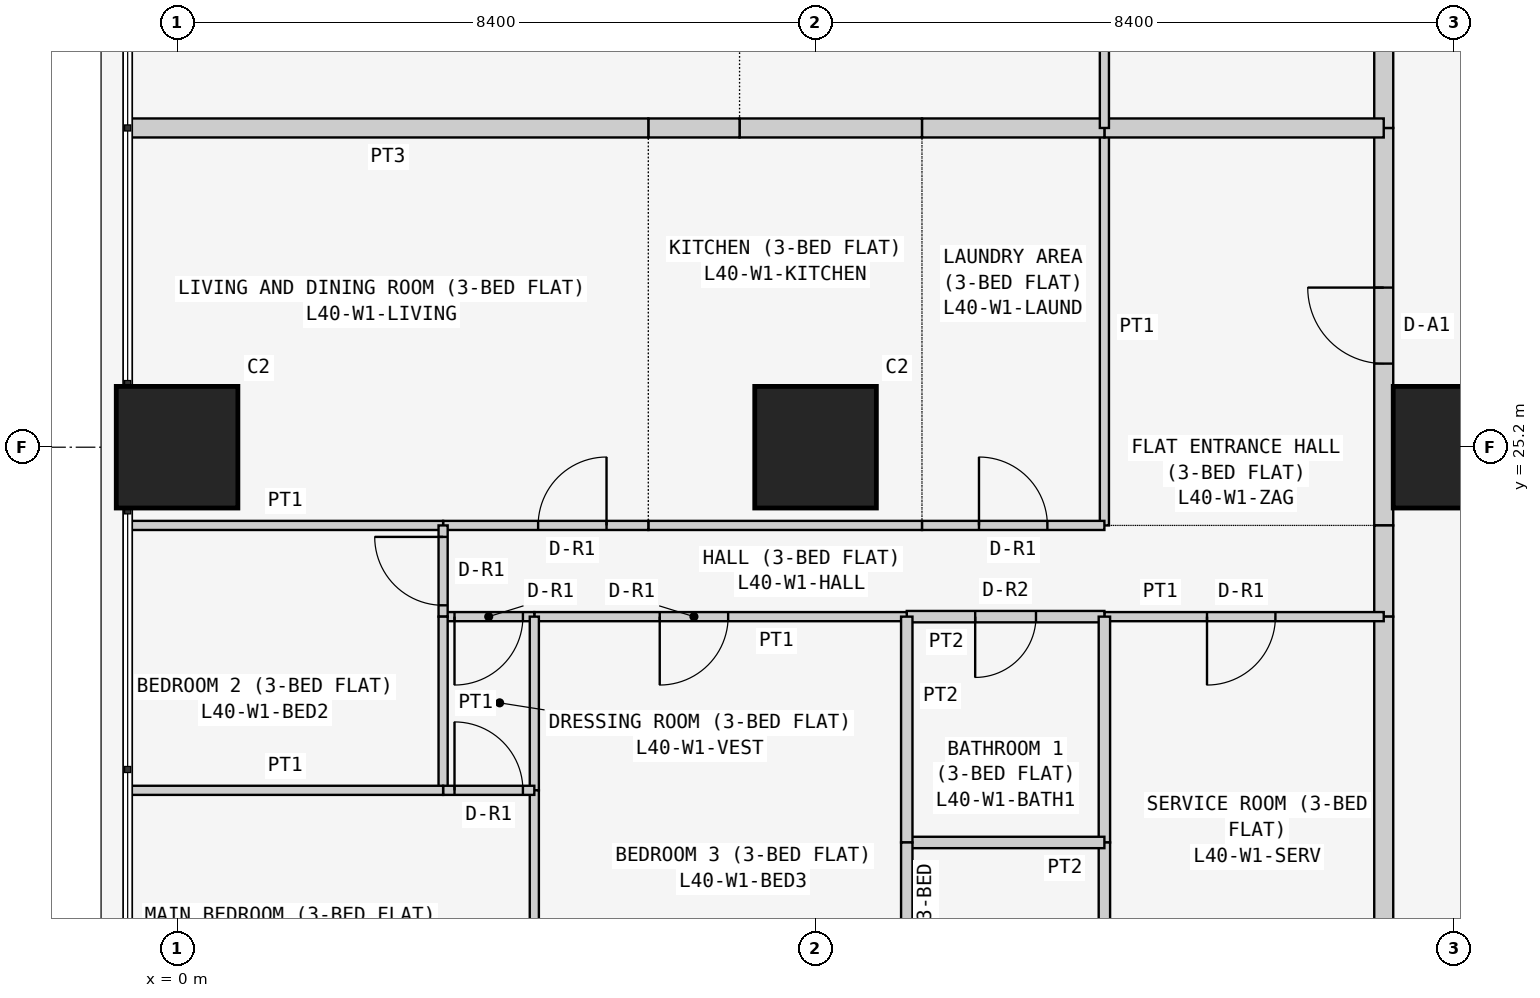
"""IFC4 building model, lengths in metres.
Left out: names, types, materials, properties, quantities, classifications, styles, units other than length and angle.
Written with IfcOpenShell. Run it as: python <this file> out.ifc"""

import sys

from ifc_helpers import new_model, si_unit, direction, frame, frame_2d, origin, origin_2d, place, context, subcontext, project, spatial, rectangle, extrude, element, fill, save


model = new_model("IFC4")
c1 = context("Model", 3, precision=1e-05, world=origin(), true_north=direction((0.0, 1.0)))
c2 = subcontext(c1, "Body", "Model", "MODEL_VIEW")
j1 = project(units=[si_unit("LENGTHUNIT", "METRE"), si_unit("PLANEANGLEUNIT", "RADIAN")], contexts=[c1])
p1 = place(None, origin())
s1 = spatial("IfcSite", under=j1, at=p1, CompositionType="ELEMENT")
p2 = place(p1, origin())
s2 = spatial("IfcBuilding", under=s1, at=p2, CompositionType="ELEMENT")
p3 = place(p2, frame((0.0, 0.0, 155.7)))
s3 = spatial("IfcBuildingStorey", under=s2, at=p3, CompositionType="ELEMENT", Elevation=155.7)
for number, where, z_axis, x_axis in (
    (1, (0.0, 25.2, 0.0), (0.0, 0.0, 1.0), (1.0, 0.0, 0.0)),
    (2, (8.4, 25.2, 0.0), (0.0, 0.0, 1.0), (1.0, 0.0, 0.0)),
    (3, (16.8, 25.2, 0.0), (0.0, 0.0, 1.0), (1.0, 0.0, 0.0)),
):
    element("IfcColumn", number, at=place(p3, frame(where, z_axis=z_axis, x_axis=x_axis)), inside=s3, PredefinedType="COLUMN", context=c2, shape_type="SweptSolid", body=[
        extrude(rectangle(XDim=1.6, YDim=1.6, at=origin_2d()), origin(), (0.0, 0.0, 1.0), 3.6),
    ])
p4 = place(p3, frame((15.875, 24.171, 0.0), z_axis=(0.0, 0.0, 1.0), x_axis=(0.0, 1.0, 0.0)))
e4 = element("IfcWall", 4, at=p4, inside=s3, PredefinedType="PARTITIONING", context=c2, shape_type="SweptSolid", body=[
    extrude(rectangle(XDim=5.229, YDim=0.25, at=frame_2d((2.615, 0.0))), origin(), (0.0, 0.0, 1.0), 3.45),
])
p5 = place(p4, frame((2.129, 0.0, 0.0)))
e5 = element("IfcOpeningElement", 5, at=p5, cuts=e4, PredefinedType="OPENING", context=c2, shape_type="SweptSolid", body=[
    extrude(rectangle(XDim=1.0, YDim=2.1, at=frame_2d((0.5, 1.05))), frame((0.0, 0.135, 0.0), z_axis=(0.0, -1.0, 0.0), x_axis=(1.0, 0.0, 0.0)), (0.0, 0.0, 1.0), 0.27),
])
p6 = place(p3, frame((15.875, 22.971, 0.0), z_axis=(0.0, 0.0, 1.0), x_axis=(0.0, 1.0, 0.0)))
e6 = element("IfcWall", 6, at=p6, inside=s3, PredefinedType="PARTITIONING", context=c2, shape_type="SweptSolid", body=[
    extrude(rectangle(XDim=1.2, YDim=0.25, at=frame_2d((0.6, 0.0))), origin(), (0.0, 0.0, 1.0), 3.45),
])
p7 = place(p3, frame((15.875, 16.1, 0.0), z_axis=(0.0, 0.0, 1.0), x_axis=(0.0, 1.0, 0.0)))
e7 = element("IfcWall", 7, at=p7, inside=s3, PredefinedType="PARTITIONING", context=c2, shape_type="SweptSolid", body=[
    extrude(rectangle(XDim=6.871, YDim=0.25, at=frame_2d((3.436, 0.0))), origin(), (0.0, 0.0, 1.0), 3.45),
])
p8 = place(p3, frame((15.875, 29.4, 0.0), z_axis=(0.0, 0.0, 1.0), x_axis=(0.0, 1.0, 0.0)))
e8 = element("IfcWall", 8, at=p8, inside=s3, PredefinedType="PARTITIONING", context=c2, shape_type="SweptSolid", body=[
    extrude(rectangle(XDim=5.229, YDim=0.25, at=frame_2d((2.615, 0.0))), origin(), (0.0, 0.0, 1.0), 3.45),
])
p9 = place(p8, frame((2.1, 0.0, 0.0)))
e9 = element("IfcOpeningElement", 9, at=p9, cuts=e8, PredefinedType="OPENING", context=c2, shape_type="SweptSolid", body=[
    extrude(rectangle(XDim=1.0, YDim=2.1, at=frame_2d((0.5, 1.05))), frame((0.0, 0.135, 0.0), z_axis=(0.0, -1.0, 0.0), x_axis=(1.0, 0.0, 0.0)), (0.0, 0.0, 1.0), 0.27),
])
p10 = place(p3, frame((12.2, 29.4, 0.0), z_axis=(0.0, 0.0, 1.0), x_axis=(0.0, -1.0, 0.0)))
e10 = element("IfcWall", 10, at=p10, inside=s3, PredefinedType="PARTITIONING", context=c2, shape_type="SweptSolid", body=[
    extrude(rectangle(XDim=5.229, YDim=0.12, at=frame_2d((2.615, 0.0))), origin(), (0.0, 0.0, 1.0), 3.45),
])
p11 = place(p3, frame((15.875, 29.4, 0.0), z_axis=(0.0, 0.0, 1.0), x_axis=(-1.0, 0.0, 0.0)))
e11 = element("IfcWall", 11, at=p11, inside=s3, PredefinedType="PARTITIONING", context=c2, shape_type="SweptSolid", body=[
    extrude(rectangle(XDim=3.675, YDim=0.25, at=frame_2d((1.837, 0.0))), origin(), (0.0, 0.0, 1.0), 3.45),
])
p12 = place(p3, frame((9.8, 24.171, 0.0), z_axis=(0.0, 0.0, 1.0), x_axis=(1.0, 0.0, 0.0)))
e12 = element("IfcWall", 12, at=p12, inside=s3, PredefinedType="PARTITIONING", context=c2, shape_type="SweptSolid", body=[
    extrude(rectangle(XDim=2.4, YDim=0.12, at=frame_2d((1.2, 0.0))), origin(), (0.0, 0.0, 1.0), 3.45),
])
p13 = place(p12, frame((0.75, 0.0, 0.0)))
e13 = element("IfcOpeningElement", 13, at=p13, cuts=e12, PredefinedType="OPENING", context=c2, shape_type="SweptSolid", body=[
    extrude(rectangle(XDim=0.9, YDim=2.1, at=frame_2d((0.45, 1.05))), frame((0.0, 0.07, 0.0), z_axis=(0.0, -1.0, 0.0), x_axis=(1.0, 0.0, 0.0)), (0.0, 0.0, 1.0), 0.14),
])
p14 = place(p3, frame((12.2, 29.4, 0.0), z_axis=(0.0, 0.0, 1.0), x_axis=(-1.0, 0.0, 0.0)))
e14 = element("IfcWall", 14, at=p14, inside=s3, PredefinedType="PARTITIONING", context=c2, shape_type="SweptSolid", body=[
    extrude(rectangle(XDim=2.4, YDim=0.25, at=frame_2d((1.2, 0.0))), origin(), (0.0, 0.0, 1.0), 3.45),
])
p15 = place(p3, frame((6.2, 24.171, 0.0), z_axis=(0.0, 0.0, 1.0), x_axis=(1.0, 0.0, 0.0)))
e15 = element("IfcWall", 15, at=p15, inside=s3, PredefinedType="PARTITIONING", context=c2, shape_type="SweptSolid", body=[
    extrude(rectangle(XDim=3.6, YDim=0.12, at=frame_2d((1.8, 0.0))), origin(), (0.0, 0.0, 1.0), 3.45),
])
p16 = place(p3, frame((9.8, 29.4, 0.0), z_axis=(0.0, 0.0, 1.0), x_axis=(-1.0, 0.0, 0.0)))
e16 = element("IfcWall", 16, at=p16, inside=s3, PredefinedType="PARTITIONING", context=c2, shape_type="SweptSolid", body=[
    extrude(rectangle(XDim=2.4, YDim=0.25, at=frame_2d((1.2, 0.0))), origin(), (0.0, 0.0, 1.0), 3.45),
])
p17 = place(p3, frame((7.4, 29.4, 0.0), z_axis=(0.0, 0.0, 1.0), x_axis=(-1.0, 0.0, 0.0)))
e17 = element("IfcWall", 17, at=p17, inside=s3, PredefinedType="PARTITIONING", context=c2, shape_type="SweptSolid", body=[
    extrude(rectangle(XDim=1.2, YDim=0.25, at=frame_2d((0.6, 0.0))), origin(), (0.0, 0.0, 1.0), 3.45),
])
p18 = place(p3, frame((3.5, 24.171, 0.0), z_axis=(0.0, 0.0, 1.0), x_axis=(1.0, 0.0, 0.0)))
e18 = element("IfcWall", 18, at=p18, inside=s3, PredefinedType="PARTITIONING", context=c2, shape_type="SweptSolid", body=[
    extrude(rectangle(XDim=2.7, YDim=0.12, at=frame_2d((1.35, 0.0))), origin(), (0.0, 0.0, 1.0), 3.45),
])
p19 = place(p18, frame((1.25, 0.0, 0.0)))
e19 = element("IfcOpeningElement", 19, at=p19, cuts=e18, PredefinedType="OPENING", context=c2, shape_type="SweptSolid", body=[
    extrude(rectangle(XDim=0.9, YDim=2.1, at=frame_2d((0.45, 1.05))), frame((0.0, 0.07, 0.0), z_axis=(0.0, -1.0, 0.0), x_axis=(1.0, 0.0, 0.0)), (0.0, 0.0, 1.0), 0.14),
])
p20 = place(p3, frame((-0.65, 24.171, 0.0), z_axis=(0.0, 0.0, 1.0), x_axis=(1.0, 0.0, 0.0)))
e20 = element("IfcWall", 20, at=p20, inside=s3, PredefinedType="PARTITIONING", context=c2, shape_type="SweptSolid", body=[
    extrude(rectangle(XDim=4.15, YDim=0.12, at=frame_2d((2.075, 0.0))), origin(), (0.0, 0.0, 1.0), 3.45),
])
p21 = place(p3, frame((6.2, 29.4, 0.0), z_axis=(0.0, 0.0, 1.0), x_axis=(-1.0, 0.0, 0.0)))
e21 = element("IfcWall", 21, at=p21, inside=s3, PredefinedType="PARTITIONING", context=c2, shape_type="SweptSolid", body=[
    extrude(rectangle(XDim=6.85, YDim=0.25, at=frame_2d((3.425, 0.0))), origin(), (0.0, 0.0, 1.0), 3.45),
])
p22 = place(p3, frame((12.2, 22.971, 0.0), z_axis=(0.0, 0.0, 1.0), x_axis=(1.0, 0.0, 0.0)))
e22 = element("IfcWall", 22, at=p22, inside=s3, PredefinedType="PARTITIONING", context=c2, shape_type="SweptSolid", body=[
    extrude(rectangle(XDim=3.675, YDim=0.12, at=frame_2d((1.837, 0.0))), origin(), (0.0, 0.0, 1.0), 3.45),
])
p23 = place(p22, frame((1.35, 0.0, 0.0)))
e23 = element("IfcOpeningElement", 23, at=p23, cuts=e22, PredefinedType="OPENING", context=c2, shape_type="SweptSolid", body=[
    extrude(rectangle(XDim=0.9, YDim=2.1, at=frame_2d((0.45, 1.05))), frame((0.0, 0.07, 0.0), z_axis=(0.0, -1.0, 0.0), x_axis=(1.0, 0.0, 0.0)), (0.0, 0.0, 1.0), 0.14),
])
p24 = place(p3, frame((9.6, 22.971, 0.0), z_axis=(0.0, 0.0, 1.0), x_axis=(1.0, 0.0, 0.0)))
e24 = element("IfcWall", 24, at=p24, inside=s3, PredefinedType="PARTITIONING", context=c2, shape_type="SweptSolid", body=[
    extrude(rectangle(XDim=2.6, YDim=0.15, at=frame_2d((1.3, 0.0))), origin(), (0.0, 0.0, 1.0), 3.45),
])
p25 = place(p24, frame((0.9, 0.0, 0.0)))
e25 = element("IfcOpeningElement", 25, at=p25, cuts=e24, PredefinedType="OPENING", context=c2, shape_type="SweptSolid", body=[
    extrude(rectangle(XDim=0.8, YDim=2.1, at=frame_2d((0.4, 1.05))), frame((0.0, 0.085, 0.0), z_axis=(0.0, -1.0, 0.0), x_axis=(1.0, 0.0, 0.0)), (0.0, 0.0, 1.0), 0.17),
])
p26 = place(p3, frame((4.7, 22.971, 0.0), z_axis=(0.0, 0.0, 1.0), x_axis=(1.0, 0.0, 0.0)))
e26 = element("IfcWall", 26, at=p26, inside=s3, PredefinedType="PARTITIONING", context=c2, shape_type="SweptSolid", body=[
    extrude(rectangle(XDim=4.9, YDim=0.12, at=frame_2d((2.45, 0.0))), origin(), (0.0, 0.0, 1.0), 3.45),
])
p27 = place(p26, frame((1.65, 0.0, 0.0)))
e27 = element("IfcOpeningElement", 27, at=p27, cuts=e26, PredefinedType="OPENING", context=c2, shape_type="SweptSolid", body=[
    extrude(rectangle(XDim=0.9, YDim=2.1, at=frame_2d((0.45, 1.05))), frame((0.0, 0.07, 0.0), z_axis=(0.0, -1.0, 0.0), x_axis=(1.0, 0.0, 0.0)), (0.0, 0.0, 1.0), 0.14),
])
p28 = place(p3, frame((3.5, 22.971, 0.0), z_axis=(0.0, 0.0, 1.0), x_axis=(1.0, 0.0, 0.0)))
e28 = element("IfcWall", 28, at=p28, inside=s3, PredefinedType="PARTITIONING", context=c2, shape_type="SweptSolid", body=[
    extrude(rectangle(XDim=1.2, YDim=0.12, at=frame_2d((0.6, 0.0))), origin(), (0.0, 0.0, 1.0), 3.45),
])
p29 = place(p28, frame((0.15, 0.0, 0.0)))
e29 = element("IfcOpeningElement", 29, at=p29, cuts=e28, PredefinedType="OPENING", context=c2, shape_type="SweptSolid", body=[
    extrude(rectangle(XDim=0.9, YDim=2.1, at=frame_2d((0.45, 1.05))), frame((0.0, 0.07, 0.0), z_axis=(0.0, -1.0, 0.0), x_axis=(1.0, 0.0, 0.0)), (0.0, 0.0, 1.0), 0.14),
])
p30 = place(p3, frame((3.5, 24.171, 0.0), z_axis=(0.0, 0.0, 1.0), x_axis=(0.0, -1.0, 0.0)))
e30 = element("IfcWall", 30, at=p30, inside=s3, PredefinedType="PARTITIONING", context=c2, shape_type="SweptSolid", body=[
    extrude(rectangle(XDim=1.2, YDim=0.12, at=frame_2d((0.6, 0.0))), origin(), (0.0, 0.0, 1.0), 3.45),
])
p31 = place(p30, frame((0.151, 0.0, 0.0)))
e31 = element("IfcOpeningElement", 31, at=p31, cuts=e30, PredefinedType="OPENING", context=c2, shape_type="SweptSolid", body=[
    extrude(rectangle(XDim=0.9, YDim=2.1, at=frame_2d((0.45, 1.05))), frame((0.0, 0.07, 0.0), z_axis=(0.0, -1.0, 0.0), x_axis=(1.0, 0.0, 0.0)), (0.0, 0.0, 1.0), 0.14),
])
p32 = place(p3, frame((12.2, 22.971, 0.0), z_axis=(0.0, 0.0, 1.0), x_axis=(0.0, -1.0, 0.0)))
e32 = element("IfcWall", 32, at=p32, inside=s3, PredefinedType="PARTITIONING", context=c2, shape_type="SweptSolid", body=[
    extrude(rectangle(XDim=2.971, YDim=0.15, at=frame_2d((1.485, 0.0))), origin(), (0.0, 0.0, 1.0), 3.45),
])
p33 = place(p3, frame((12.2, 20.0, 0.0), z_axis=(0.0, 0.0, 1.0), x_axis=(0.0, -1.0, 0.0)))
e33 = element("IfcWall", 33, at=p33, inside=s3, PredefinedType="PARTITIONING", context=c2, shape_type="SweptSolid", body=[
    extrude(rectangle(XDim=3.9, YDim=0.15, at=frame_2d((1.95, 0.0))), origin(), (0.0, 0.0, 1.0), 3.45),
])
p34 = place(p33, frame((1.45, 0.0, 0.0)))
e34 = element("IfcOpeningElement", 34, at=p34, cuts=e33, PredefinedType="OPENING", context=c2, shape_type="SweptSolid", body=[
    extrude(rectangle(XDim=0.8, YDim=2.1, at=frame_2d((0.4, 1.05))), frame((0.0, 0.085, 0.0), z_axis=(0.0, -1.0, 0.0), x_axis=(1.0, 0.0, 0.0)), (0.0, 0.0, 1.0), 0.17),
])
p35 = place(p3, frame((9.6, 20.0, 0.0), z_axis=(0.0, 0.0, 1.0), x_axis=(1.0, 0.0, 0.0)))
e35 = element("IfcWall", 35, at=p35, inside=s3, PredefinedType="PARTITIONING", context=c2, shape_type="SweptSolid", body=[
    extrude(rectangle(XDim=2.6, YDim=0.15, at=frame_2d((1.3, 0.0))), origin(), (0.0, 0.0, 1.0), 3.45),
])
p36 = place(p3, frame((9.6, 22.971, 0.0), z_axis=(0.0, 0.0, 1.0), x_axis=(0.0, -1.0, 0.0)))
e36 = element("IfcWall", 36, at=p36, inside=s3, PredefinedType="PARTITIONING", context=c2, shape_type="SweptSolid", body=[
    extrude(rectangle(XDim=2.971, YDim=0.15, at=frame_2d((1.485, 0.0))), origin(), (0.0, 0.0, 1.0), 3.45),
])
p37 = place(p3, frame((9.6, 20.0, 0.0), z_axis=(0.0, 0.0, 1.0), x_axis=(0.0, -1.0, 0.0)))
e37 = element("IfcWall", 37, at=p37, inside=s3, PredefinedType="PARTITIONING", context=c2, shape_type="SweptSolid", body=[
    extrude(rectangle(XDim=3.9, YDim=0.15, at=frame_2d((1.95, 0.0))), origin(), (0.0, 0.0, 1.0), 3.45),
])
p38 = place(p3, frame((4.7, 22.971, 0.0), z_axis=(0.0, 0.0, 1.0), x_axis=(0.0, -1.0, 0.0)))
e38 = element("IfcWall", 38, at=p38, inside=s3, PredefinedType="PARTITIONING", context=c2, shape_type="SweptSolid", body=[
    extrude(rectangle(XDim=2.285, YDim=0.12, at=frame_2d((1.143, 0.0))), origin(), (0.0, 0.0, 1.0), 3.45),
])
p39 = place(p3, frame((4.7, 20.686, 0.0), z_axis=(0.0, 0.0, 1.0), x_axis=(0.0, -1.0, 0.0)))
e39 = element("IfcWall", 39, at=p39, inside=s3, PredefinedType="PARTITIONING", context=c2, shape_type="SweptSolid", body=[
    extrude(rectangle(XDim=4.586, YDim=0.12, at=frame_2d((2.293, 0.0))), origin(), (0.0, 0.0, 1.0), 3.45),
])
p40 = place(p3, frame((3.5, 22.971, 0.0), z_axis=(0.0, 0.0, 1.0), x_axis=(0.0, -1.0, 0.0)))
e40 = element("IfcWall", 40, at=p40, inside=s3, PredefinedType="PARTITIONING", context=c2, shape_type="SweptSolid", body=[
    extrude(rectangle(XDim=2.285, YDim=0.12, at=frame_2d((1.143, 0.0))), origin(), (0.0, 0.0, 1.0), 3.45),
])
p41 = place(p3, frame((3.5, 20.686, 0.0), z_axis=(0.0, 0.0, 1.0), x_axis=(1.0, 0.0, 0.0)))
e41 = element("IfcWall", 41, at=p41, inside=s3, PredefinedType="PARTITIONING", context=c2, shape_type="SweptSolid", body=[
    extrude(rectangle(XDim=1.2, YDim=0.12, at=frame_2d((0.6, 0.0))), origin(), (0.0, 0.0, 1.0), 3.45),
])
p42 = place(p41, frame((0.15, 0.0, 0.0)))
e42 = element("IfcOpeningElement", 42, at=p42, cuts=e41, PredefinedType="OPENING", context=c2, shape_type="SweptSolid", body=[
    extrude(rectangle(XDim=0.9, YDim=2.1, at=frame_2d((0.45, 1.05))), frame((0.0, 0.07, 0.0), z_axis=(0.0, -1.0, 0.0), x_axis=(1.0, 0.0, 0.0)), (0.0, 0.0, 1.0), 0.14),
])
p43 = place(p3, frame((-0.65, 20.686, 0.0), z_axis=(0.0, 0.0, 1.0), x_axis=(1.0, 0.0, 0.0)))
e43 = element("IfcWall", 43, at=p43, inside=s3, PredefinedType="PARTITIONING", context=c2, shape_type="SweptSolid", body=[
    extrude(rectangle(XDim=4.15, YDim=0.12, at=frame_2d((2.075, 0.0))), origin(), (0.0, 0.0, 1.0), 3.45),
])
p44 = place(p3, frame((12.2, 29.4, 0.0), z_axis=(0.0, 0.0, 1.0), x_axis=(0.0, 1.0, 0.0)))
e44 = element("IfcWall", 44, at=p44, inside=s3, PredefinedType="PARTITIONING", context=c2, shape_type="SweptSolid", body=[
    extrude(rectangle(XDim=5.229, YDim=0.12, at=frame_2d((2.615, 0.0))), origin(), (0.0, 0.0, 1.0), 3.45),
])
p45 = place(p44, frame((1.05, 0.0, 0.0)))
e45 = element("IfcOpeningElement", 45, at=p45, cuts=e44, PredefinedType="OPENING", context=c2, shape_type="SweptSolid", body=[
    extrude(rectangle(XDim=0.9, YDim=2.1, at=frame_2d((0.45, 1.05))), frame((0.0, 0.07, 0.0), z_axis=(0.0, -1.0, 0.0), x_axis=(1.0, 0.0, 0.0)), (0.0, 0.0, 1.0), 0.14),
])
p46 = place(p5, origin())
e46 = element("IfcDoor", 46, at=p46, inside=s3, OperationType="SINGLE_SWING_RIGHT", PredefinedType="DOOR", context=c2, shape_type="SweptSolid", body=[
    extrude(rectangle(XDim=1.0, YDim=2.1, at=frame_2d((0.5, 1.05))), frame((0.0, 0.025, 0.0), z_axis=(0.0, -1.0, 0.0), x_axis=(1.0, 0.0, 0.0)), (0.0, 0.0, 1.0), 0.05),
])
fill(e5, e46)
p47 = place(p13, origin())
e47 = element("IfcDoor", 47, at=p47, inside=s3, OperationType="SINGLE_SWING_LEFT", PredefinedType="DOOR", context=c2, shape_type="SweptSolid", body=[
    extrude(rectangle(XDim=0.9, YDim=2.1, at=frame_2d((0.45, 1.05))), frame((0.0, 0.025, 0.0), z_axis=(0.0, -1.0, 0.0), x_axis=(1.0, 0.0, 0.0)), (0.0, 0.0, 1.0), 0.05),
])
fill(e13, e47)
p48 = place(p19, origin())
e48 = element("IfcDoor", 48, at=p48, inside=s3, OperationType="SINGLE_SWING_RIGHT", PredefinedType="DOOR", context=c2, shape_type="SweptSolid", body=[
    extrude(rectangle(XDim=0.9, YDim=2.1, at=frame_2d((0.45, 1.05))), frame((0.0, 0.025, 0.0), z_axis=(0.0, -1.0, 0.0), x_axis=(1.0, 0.0, 0.0)), (0.0, 0.0, 1.0), 0.05),
])
fill(e19, e48)
p49 = place(p23, frame((0.9, 0.0, 0.0), z_axis=(0.0, 0.0, 1.0), x_axis=(-1.0, 0.0, 0.0)))
e49 = element("IfcDoor", 49, at=p49, inside=s3, OperationType="SINGLE_SWING_RIGHT", PredefinedType="DOOR", context=c2, shape_type="SweptSolid", body=[
    extrude(rectangle(XDim=0.9, YDim=2.1, at=frame_2d((0.45, 1.05))), frame((0.0, 0.025, 0.0), z_axis=(0.0, -1.0, 0.0), x_axis=(1.0, 0.0, 0.0)), (0.0, 0.0, 1.0), 0.05),
])
fill(e23, e49)
p50 = place(p25, frame((0.8, 0.0, 0.0), z_axis=(0.0, 0.0, 1.0), x_axis=(-1.0, 0.0, 0.0)))
e50 = element("IfcDoor", 50, at=p50, inside=s3, OperationType="SINGLE_SWING_RIGHT", PredefinedType="DOOR", context=c2, shape_type="SweptSolid", body=[
    extrude(rectangle(XDim=0.8, YDim=2.1, at=frame_2d((0.4, 1.05))), frame((0.0, 0.025, 0.0), z_axis=(0.0, -1.0, 0.0), x_axis=(1.0, 0.0, 0.0)), (0.0, 0.0, 1.0), 0.05),
])
fill(e25, e50)
p51 = place(p27, frame((0.9, 0.0, 0.0), z_axis=(0.0, 0.0, 1.0), x_axis=(-1.0, 0.0, 0.0)))
e51 = element("IfcDoor", 51, at=p51, inside=s3, OperationType="SINGLE_SWING_RIGHT", PredefinedType="DOOR", context=c2, shape_type="SweptSolid", body=[
    extrude(rectangle(XDim=0.9, YDim=2.1, at=frame_2d((0.45, 1.05))), frame((0.0, 0.025, 0.0), z_axis=(0.0, -1.0, 0.0), x_axis=(1.0, 0.0, 0.0)), (0.0, 0.0, 1.0), 0.05),
])
fill(e27, e51)
p52 = place(p29, frame((0.9, 0.0, 0.0), z_axis=(0.0, 0.0, 1.0), x_axis=(-1.0, 0.0, 0.0)))
e52 = element("IfcDoor", 52, at=p52, inside=s3, OperationType="SINGLE_SWING_RIGHT", PredefinedType="DOOR", context=c2, shape_type="SweptSolid", body=[
    extrude(rectangle(XDim=0.9, YDim=2.1, at=frame_2d((0.45, 1.05))), frame((0.0, 0.025, 0.0), z_axis=(0.0, -1.0, 0.0), x_axis=(1.0, 0.0, 0.0)), (0.0, 0.0, 1.0), 0.05),
])
fill(e29, e52)
p53 = place(p42, origin())
e53 = element("IfcDoor", 53, at=p53, inside=s3, OperationType="SINGLE_SWING_LEFT", PredefinedType="DOOR", context=c2, shape_type="SweptSolid", body=[
    extrude(rectangle(XDim=0.9, YDim=2.1, at=frame_2d((0.45, 1.05))), frame((0.0, 0.025, 0.0), z_axis=(0.0, -1.0, 0.0), x_axis=(1.0, 0.0, 0.0)), (0.0, 0.0, 1.0), 0.05),
])
fill(e42, e53)
p54 = place(p31, frame((0.9, 0.0, 0.0), z_axis=(0.0, 0.0, 1.0), x_axis=(-1.0, 0.0, 0.0)))
e54 = element("IfcDoor", 54, at=p54, inside=s3, OperationType="SINGLE_SWING_RIGHT", PredefinedType="DOOR", context=c2, shape_type="SweptSolid", body=[
    extrude(rectangle(XDim=0.9, YDim=2.1, at=frame_2d((0.45, 1.05))), frame((0.0, 0.025, 0.0), z_axis=(0.0, -1.0, 0.0), x_axis=(1.0, 0.0, 0.0)), (0.0, 0.0, 1.0), 0.05),
])
fill(e31, e54)
save(model, sys.argv[1])
